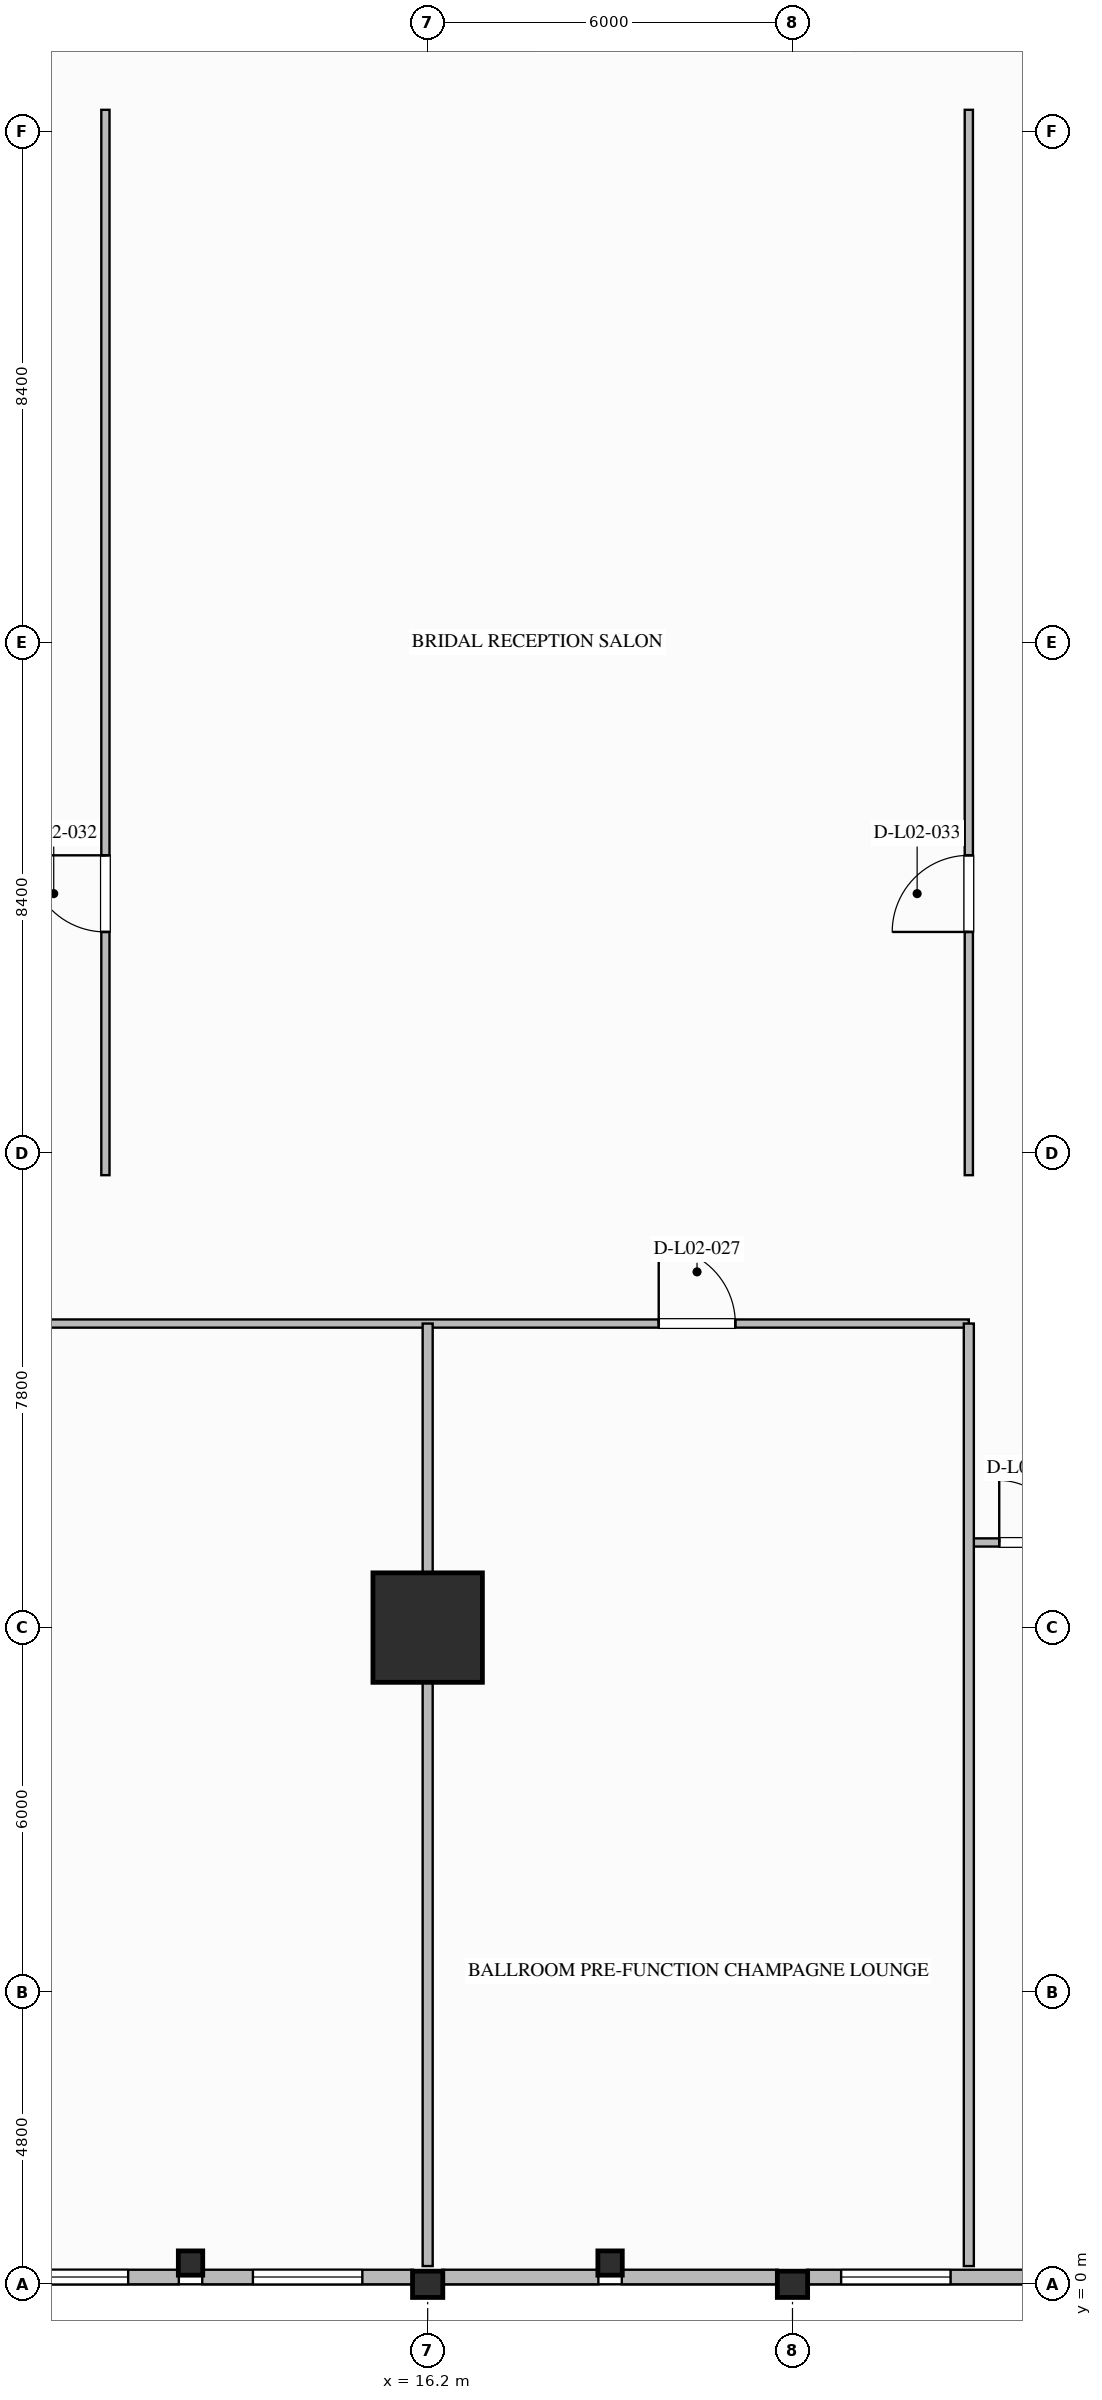
"""IFC4 building model, lengths in metres.
Left out: names, types, materials, properties, quantities, classifications, styles, units other than length and angle.
Written with IfcOpenShell. Run it as: python <this file> out.ifc"""

import sys

from ifc_helpers import new_model, si_unit, direction, frame, frame_2d, origin, origin_2d, place, context, subcontext, project, spatial, rectangle, i_section, extrude, element, fill, save


model = new_model("IFC4")
c1 = context("Model", 3, precision=1e-05, world=origin(), true_north=direction((0.0, 1.0)))
c2 = subcontext(c1, "Body", "Model", "MODEL_VIEW")
j1 = project(units=[si_unit("LENGTHUNIT", "METRE"), si_unit("PLANEANGLEUNIT", "RADIAN")], contexts=[c1])
p1 = place(None, origin())
s1 = spatial("IfcSite", under=j1, at=p1, CompositionType="ELEMENT")
p2 = place(p1, origin())
s2 = spatial("IfcBuilding", under=s1, at=p2, CompositionType="ELEMENT")
p3 = place(p2, frame((0.0, 0.0, 10.8)))
s3 = spatial("IfcBuildingStorey", under=s2, at=p3, CompositionType="ELEMENT", Elevation=10.8)
p4 = place(p3, frame((16.2, 10.8, 0.0), z_axis=(0.0, 0.0, 1.0), x_axis=(1.0, 0.0, 0.0)))
e1 = element("IfcColumn", 1, at=p4, inside=s3, PredefinedType="COLUMN", context=c2, shape_type="SweptSolid", body=[
    extrude(rectangle(XDim=1.8, YDim=1.8, at=origin_2d()), origin(), (0.0, 0.0, 1.0), 6.4),
])
for number, where, z_axis, x_axis in (
    (2, (16.2, 0.0, 0.0), (0.0, 0.0, 1.0), (0.0, 1.0, 0.0)),
    (3, (22.2, 0.0, 0.0), (0.0, 0.0, 1.0), (0.0, 1.0, 0.0)),
):
    element("IfcColumn", number, at=place(p3, frame(where, z_axis=z_axis, x_axis=x_axis)), inside=s3, PredefinedType="COLUMN", context=c2, shape_type="SweptSolid", body=[
        extrude(i_section(OverallWidth=0.432, OverallDepth=0.498, WebThickness=0.056, FlangeThickness=0.089, FilletRadius=0.03, at=origin_2d()), origin(), (0.0, 0.0, 1.0), 6.4),
    ])
for number, where, z_axis, x_axis in (
    (4, (12.3, 0.35, 0.0), (0.0, 0.0, 1.0), (1.0, 0.0, 0.0)),
    (5, (19.2, 0.35, 0.0), (0.0, 0.0, 1.0), (1.0, 0.0, 0.0)),
):
    element("IfcColumn", number, at=place(p3, frame(where, z_axis=z_axis, x_axis=x_axis)), inside=s3, PredefinedType="COLUMN", context=c2, shape_type="SweptSolid", body=[
        extrude(i_section(OverallWidth=0.401, OverallDepth=0.399, WebThickness=0.025, FlangeThickness=0.04, FilletRadius=0.025, at=origin_2d()), origin(), (0.0, 0.0, 1.0), 6.4),
    ])
p5 = place(p3, frame((12.107, 0.12, 0.0), z_axis=(0.0, 0.0, 1.0), x_axis=(-1.0, 0.0, 0.0)))
e6 = element("IfcWall", 6, at=p5, inside=s3, PredefinedType="STANDARD", context=c2, shape_type="SweptSolid", body=[
    extrude(rectangle(XDim=3.467, YDim=0.24, at=frame_2d((1.733, 0.0))), origin(), (0.0, 0.0, 1.0), 5.404),
])
p6 = place(p5, frame((0.833, 0.0, 0.65)))
e7 = element("IfcOpeningElement", 7, at=p6, cuts=e6, PredefinedType="OPENING", context=c2, shape_type="SweptSolid", body=[
    extrude(rectangle(XDim=1.8, YDim=2.2, at=frame_2d((0.9, 1.1))), frame((0.0, 0.13, 0.0), z_axis=(0.0, -1.0, 0.0), x_axis=(1.0, 0.0, 0.0)), (0.0, 0.0, 1.0), 0.26),
])
p7 = place(p3, frame((15.959, 0.12, 0.0), z_axis=(0.0, 0.0, 1.0), x_axis=(-1.0, 0.0, 0.0)))
e8 = element("IfcWall", 8, at=p7, inside=s3, PredefinedType="STANDARD", context=c2, shape_type="SweptSolid", body=[
    extrude(rectangle(XDim=3.466, YDim=0.24, at=frame_2d((1.733, 0.0))), origin(), (0.0, 0.0, 1.0), 5.404),
])
p8 = place(p7, frame((0.833, 0.0, 0.65)))
e9 = element("IfcOpeningElement", 9, at=p8, cuts=e8, PredefinedType="OPENING", context=c2, shape_type="SweptSolid", body=[
    extrude(rectangle(XDim=1.8, YDim=2.2, at=frame_2d((0.9, 1.1))), frame((0.0, 0.13, 0.0), z_axis=(0.0, -1.0, 0.0), x_axis=(1.0, 0.0, 0.0)), (0.0, 0.0, 1.0), 0.26),
])
for number, where, z_axis, x_axis in (
    (10, (19.007, 0.12, 0.0), (0.0, 0.0, 1.0), (-1.0, 0.0, 0.0)),
    (11, (21.959, 0.12, 0.0), (0.0, 0.0, 1.0), (-1.0, 0.0, 0.0)),
):
    element("IfcWall", number, at=place(p3, frame(where, z_axis=z_axis, x_axis=x_axis)), inside=s3, PredefinedType="STANDARD", context=c2, shape_type="SweptSolid", body=[
        extrude(rectangle(XDim=2.566, YDim=0.24, at=frame_2d((1.283, 0.0))), origin(), (0.0, 0.0, 1.0), 5.404),
    ])
p9 = place(p3, frame((26.759, 0.12, 0.0), z_axis=(0.0, 0.0, 1.0), x_axis=(-1.0, 0.0, 0.0)))
e12 = element("IfcWall", 12, at=p9, inside=s3, PredefinedType="STANDARD", context=c2, shape_type="SweptSolid", body=[
    extrude(rectangle(XDim=4.318, YDim=0.24, at=frame_2d((2.159, 0.0))), origin(), (0.0, 0.0, 1.0), 5.404),
])
p10 = place(p9, frame((1.959, 0.0, 0.65)))
e13 = element("IfcOpeningElement", 13, at=p10, cuts=e12, PredefinedType="OPENING", context=c2, shape_type="SweptSolid", body=[
    extrude(rectangle(XDim=1.8, YDim=2.2, at=frame_2d((0.9, 1.1))), frame((0.0, 0.13, 0.0), z_axis=(0.0, -1.0, 0.0), x_axis=(1.0, 0.0, 0.0)), (0.0, 0.0, 1.0), 0.26),
])
p11 = place(p3, frame((-21.2, 15.8, 0.0), z_axis=(0.0, 0.0, 1.0), x_axis=(1.0, 0.0, 0.0)))
e14 = element("IfcWall", 14, at=p11, inside=s3, PredefinedType="PARTITIONING", context=c2, shape_type="SweptSolid", body=[
    extrude(rectangle(XDim=46.3, YDim=0.135, at=frame_2d((23.15, 0.0))), origin(), (0.0, 0.0, 1.0), 6.1),
])
p12 = place(p11, frame((4.0, 0.0, 0.0)))
e15 = element("IfcOpeningElement", 15, at=p12, cuts=e14, PredefinedType="OPENING", context=c2, shape_type="SweptSolid", body=[
    extrude(rectangle(XDim=1.8, YDim=2.35, at=frame_2d((0.9, 1.175))), frame((0.0, 0.077, 0.0), z_axis=(0.0, -1.0, 0.0), x_axis=(1.0, 0.0, 0.0)), (0.0, 0.0, 1.0), 0.155),
])
p13 = place(p11, frame((14.0, 0.0, 0.0)))
e16 = element("IfcOpeningElement", 16, at=p13, cuts=e14, PredefinedType="OPENING", context=c2, shape_type="SweptSolid", body=[
    extrude(rectangle(XDim=1.8, YDim=2.35, at=frame_2d((0.9, 1.175))), frame((0.0, 0.077, 0.0), z_axis=(0.0, -1.0, 0.0), x_axis=(1.0, 0.0, 0.0)), (0.0, 0.0, 1.0), 0.155),
])
p14 = place(p11, frame((23.0, 0.0, 0.0)))
e17 = element("IfcOpeningElement", 17, at=p14, cuts=e14, PredefinedType="OPENING", context=c2, shape_type="SweptSolid", body=[
    extrude(rectangle(XDim=1.8, YDim=2.35, at=frame_2d((0.9, 1.175))), frame((0.0, 0.077, 0.0), z_axis=(0.0, -1.0, 0.0), x_axis=(1.0, 0.0, 0.0)), (0.0, 0.0, 1.0), 0.155),
])
p15 = place(p11, frame((41.2, 0.0, 0.0)))
e18 = element("IfcOpeningElement", 18, at=p15, cuts=e14, PredefinedType="OPENING", context=c2, shape_type="SweptSolid", body=[
    extrude(rectangle(XDim=1.26, YDim=2.2, at=frame_2d((0.63, 1.1))), frame((0.0, 0.077, 0.0), z_axis=(0.0, -1.0, 0.0), x_axis=(1.0, 0.0, 0.0)), (0.0, 0.0, 1.0), 0.155),
])
p16 = place(p3, frame((10.9, 18.24, 0.0), z_axis=(0.0, 0.0, 1.0), x_axis=(0.0, 1.0, 0.0)))
e19 = element("IfcWall", 19, at=p16, inside=s3, PredefinedType="PARTITIONING", context=c2, shape_type="SweptSolid", body=[
    extrude(rectangle(XDim=17.52, YDim=0.135, at=frame_2d((8.76, 0.0))), origin(), (0.0, 0.0, 1.0), 6.1),
])
p17 = place(p16, frame((4.0, 0.0, 0.0)))
e20 = element("IfcOpeningElement", 20, at=p17, cuts=e19, PredefinedType="OPENING", context=c2, shape_type="SweptSolid", body=[
    extrude(rectangle(XDim=1.26, YDim=2.2, at=frame_2d((0.63, 1.1))), frame((0.0, 0.077, 0.0), z_axis=(0.0, -1.0, 0.0), x_axis=(1.0, 0.0, 0.0)), (0.0, 0.0, 1.0), 0.155),
])
p18 = place(p3, frame((25.1, 18.24, 0.0), z_axis=(0.0, 0.0, 1.0), x_axis=(0.0, 1.0, 0.0)))
e21 = element("IfcWall", 21, at=p18, inside=s3, PredefinedType="PARTITIONING", context=c2, shape_type="SweptSolid", body=[
    extrude(rectangle(XDim=17.52, YDim=0.135, at=frame_2d((8.76, 0.0))), origin(), (0.0, 0.0, 1.0), 6.1),
])
p19 = place(p18, frame((4.0, 0.0, 0.0)))
e22 = element("IfcOpeningElement", 22, at=p19, cuts=e21, PredefinedType="OPENING", context=c2, shape_type="SweptSolid", body=[
    extrude(rectangle(XDim=1.26, YDim=2.2, at=frame_2d((0.63, 1.1))), frame((0.0, 0.077, 0.0), z_axis=(0.0, -1.0, 0.0), x_axis=(1.0, 0.0, 0.0)), (0.0, 0.0, 1.0), 0.155),
])
p20 = place(p3, frame((25.1, 12.2, 0.0), z_axis=(0.0, 0.0, 1.0), x_axis=(1.0, 0.0, 0.0)))
e23 = element("IfcWall", 23, at=p20, inside=s3, PredefinedType="PARTITIONING", context=c2, shape_type="SweptSolid", body=[
    extrude(rectangle(XDim=2.45, YDim=0.135, at=frame_2d((1.225, 0.0))), origin(), (0.0, 0.0, 1.0), 6.1),
])
p21 = place(p20, frame((0.5, 0.0, 0.0)))
e24 = element("IfcOpeningElement", 24, at=p21, cuts=e23, PredefinedType="OPENING", context=c2, shape_type="SweptSolid", body=[
    extrude(rectangle(XDim=1.02, YDim=2.15, at=frame_2d((0.51, 1.075))), frame((0.0, 0.077, 0.0), z_axis=(0.0, -1.0, 0.0), x_axis=(1.0, 0.0, 0.0)), (0.0, 0.0, 1.0), 0.155),
])
p22 = place(p3, frame((25.1, 0.3, 0.0), z_axis=(0.0, 0.0, 1.0), x_axis=(0.0, 1.0, 0.0)))
e25 = element("IfcWall", 25, at=p22, inside=s3, PredefinedType="PARTITIONING", context=c2, shape_type="SweptSolid", body=[
    extrude(rectangle(XDim=15.5, YDim=0.165, at=frame_2d((7.75, 0.0))), origin(), (0.0, 0.0, 1.0), 6.1),
])
p23 = place(p3, frame((16.2, 0.3, 0.0), z_axis=(0.0, 0.0, 1.0), x_axis=(0.0, 1.0, 0.0)))
e26 = element("IfcWall", 26, at=p23, inside=s3, PredefinedType="PARTITIONING", context=c2, shape_type="SweptSolid", body=[
    extrude(rectangle(XDim=15.5, YDim=0.165, at=frame_2d((7.75, 0.0))), origin(), (0.0, 0.0, 1.0), 5.137),
])
p24 = place(p6, origin())
e27 = element("IfcWindow", 27, at=p24, inside=s3, PartitioningType="SINGLE_PANEL", PredefinedType="WINDOW", context=c2, shape_type="SweptSolid", body=[
    extrude(rectangle(XDim=1.8, YDim=2.2, at=frame_2d((0.9, 1.1))), frame((0.0, 0.03, 0.0), z_axis=(0.0, -1.0, 0.0), x_axis=(1.0, 0.0, 0.0)), (0.0, 0.0, 1.0), 0.06),
])
fill(e7, e27)
p25 = place(p8, origin())
e28 = element("IfcWindow", 28, at=p25, inside=s3, PartitioningType="SINGLE_PANEL", PredefinedType="WINDOW", context=c2, shape_type="SweptSolid", body=[
    extrude(rectangle(XDim=1.8, YDim=2.2, at=frame_2d((0.9, 1.1))), frame((0.0, 0.03, 0.0), z_axis=(0.0, -1.0, 0.0), x_axis=(1.0, 0.0, 0.0)), (0.0, 0.0, 1.0), 0.06),
])
fill(e9, e28)
p26 = place(p10, origin())
e29 = element("IfcWindow", 29, at=p26, inside=s3, PartitioningType="SINGLE_PANEL", PredefinedType="WINDOW", context=c2, shape_type="SweptSolid", body=[
    extrude(rectangle(XDim=1.8, YDim=2.2, at=frame_2d((0.9, 1.1))), frame((0.0, 0.03, 0.0), z_axis=(0.0, -1.0, 0.0), x_axis=(1.0, 0.0, 0.0)), (0.0, 0.0, 1.0), 0.06),
])
fill(e13, e29)
p27 = place(p21, origin())
e30 = element("IfcDoor", 30, at=p27, inside=s3, OperationType="SINGLE_SWING_LEFT", PredefinedType="DOOR", context=c2, shape_type="SweptSolid", body=[
    extrude(rectangle(XDim=1.02, YDim=2.15, at=frame_2d((0.51, 1.075))), frame((0.0, 0.025, 0.0), z_axis=(0.0, -1.0, 0.0), x_axis=(1.0, 0.0, 0.0)), (0.0, 0.0, 1.0), 0.05),
])
fill(e24, e30)
p28 = place(p15, origin())
e31 = element("IfcDoor", 31, at=p28, inside=s3, OperationType="SINGLE_SWING_LEFT", PredefinedType="DOOR", context=c2, shape_type="SweptSolid", body=[
    extrude(rectangle(XDim=1.26, YDim=2.2, at=frame_2d((0.63, 1.1))), frame((0.0, 0.025, 0.0), z_axis=(0.0, -1.0, 0.0), x_axis=(1.0, 0.0, 0.0)), (0.0, 0.0, 1.0), 0.05),
])
fill(e18, e31)
p29 = place(p17, origin())
e32 = element("IfcDoor", 32, at=p29, inside=s3, OperationType="SINGLE_SWING_RIGHT", PredefinedType="DOOR", context=c2, shape_type="SweptSolid", body=[
    extrude(rectangle(XDim=1.26, YDim=2.2, at=frame_2d((0.63, 1.1))), frame((0.0, 0.025, 0.0), z_axis=(0.0, -1.0, 0.0), x_axis=(1.0, 0.0, 0.0)), (0.0, 0.0, 1.0), 0.05),
])
fill(e20, e32)
p30 = place(p19, origin())
e33 = element("IfcDoor", 33, at=p30, inside=s3, OperationType="SINGLE_SWING_LEFT", PredefinedType="DOOR", context=c2, shape_type="SweptSolid", body=[
    extrude(rectangle(XDim=1.26, YDim=2.2, at=frame_2d((0.63, 1.1))), frame((0.0, 0.025, 0.0), z_axis=(0.0, -1.0, 0.0), x_axis=(1.0, 0.0, 0.0)), (0.0, 0.0, 1.0), 0.05),
])
fill(e22, e33)
save(model, sys.argv[1])
